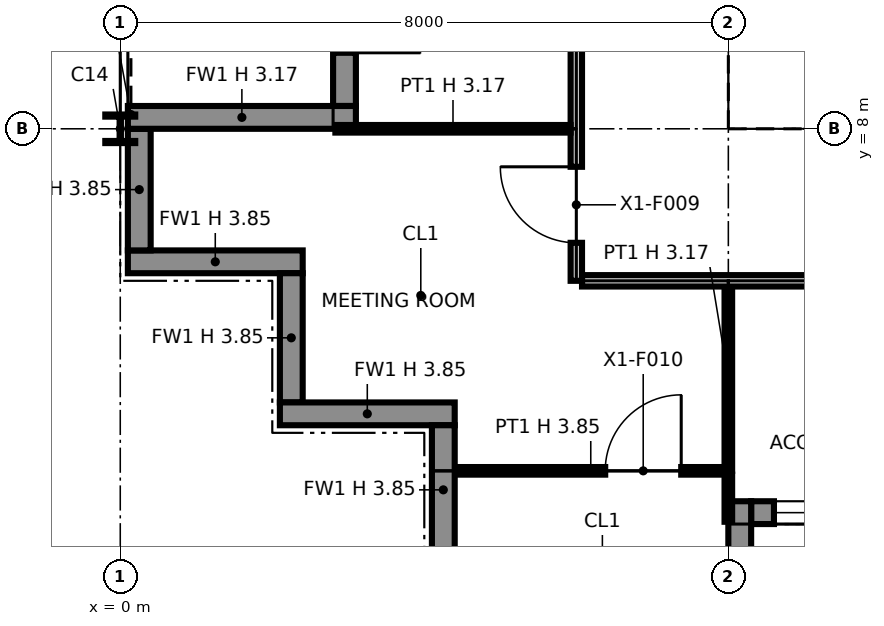
"""IFC4 building model, lengths in metres.
Left out: names, types, materials, properties, quantities, classifications, styles, units other than length and angle.
Written with IfcOpenShell. Run it as: python <this file> out.ifc"""

import sys

from ifc_helpers import new_model, si_unit, direction, frame, frame_2d, origin, origin_2d, place, context, subcontext, project, spatial, polyline, rectangle, i_section, outline, extrude, element, fill, save


model = new_model("IFC4")
c1 = context("Model", 3, precision=1e-05, world=origin(), true_north=direction((0.0, 1.0)))
c2 = subcontext(c1, "Body", "Model", "MODEL_VIEW")
j1 = project(units=[si_unit("LENGTHUNIT", "METRE"), si_unit("PLANEANGLEUNIT", "RADIAN")], contexts=[c1])
p1 = place(None, origin())
s1 = spatial("IfcSite", under=j1, at=p1, CompositionType="ELEMENT")
p2 = place(p1, origin())
s2 = spatial("IfcBuilding", under=s1, at=p2, CompositionType="ELEMENT")
p3 = place(p2, frame((0.0, 0.0, 255.0)))
s3 = spatial("IfcBuildingStorey", under=s2, at=p3, CompositionType="ELEMENT", Elevation=255.0)
p4 = place(p3, frame((0.0, 8.0, 0.0), z_axis=(0.0, 0.0, 1.0), x_axis=(1.0, 0.0, 0.0)))
e1 = element("IfcColumn", 1, at=p4, inside=s3, PredefinedType="COLUMN", context=c2, shape_type="SweptSolid", body=[
    extrude(i_section(OverallWidth=0.394, OverallDepth=0.376, WebThickness=0.017, FlangeThickness=0.028, at=origin_2d()), origin(), (0.0, 0.0, 1.0), 3.85),
])
p5 = place(p3, frame((8.0, 8.0, 0.0), z_axis=(0.0, 0.0, 1.0), x_axis=(1.0, 0.0, 0.0)))
e2 = element("IfcColumn", 2, at=p5, inside=s3, PredefinedType="COLUMN", context=c2, shape_type="SweptSolid", body=[
    extrude(i_section(OverallWidth=0.371, OverallDepth=0.361, WebThickness=0.012, FlangeThickness=0.02, at=origin_2d()), origin(), (0.0, 0.0, 1.0), 3.85),
])
p6 = place(p3, frame((0.1, 6.25, 0.0), z_axis=(0.0, 0.0, 1.0), x_axis=(1.0, 0.0, 0.0)))
e3 = element("IfcWall", 3, at=p6, inside=s3, PredefinedType="SOLIDWALL", context=c2, shape_type="SweptSolid", body=[
    extrude(rectangle(XDim=2.3, YDim=0.3, at=frame_2d((1.15, 0.0))), origin(), (0.0, 0.0, 1.0), 3.85),
])
p7 = place(p3, frame((2.25, 6.1, 0.0), z_axis=(0.0, 0.0, 1.0), x_axis=(0.0, -1.0, 0.0)))
e4 = element("IfcWall", 4, at=p7, inside=s3, PredefinedType="SOLIDWALL", context=c2, shape_type="SweptSolid", body=[
    extrude(rectangle(XDim=1.7, YDim=0.3, at=frame_2d((0.85, 0.0))), origin(), (0.0, 0.0, 1.0), 3.85),
])
p8 = place(p3, frame((2.1, 4.25, 0.0), z_axis=(0.0, 0.0, 1.0), x_axis=(1.0, 0.0, 0.0)))
e5 = element("IfcWall", 5, at=p8, inside=s3, PredefinedType="SOLIDWALL", context=c2, shape_type="SweptSolid", body=[
    extrude(rectangle(XDim=2.3, YDim=0.3, at=frame_2d((1.15, 0.0))), origin(), (0.0, 0.0, 1.0), 3.85),
])
p9 = place(p3, frame((4.25, 4.1, 0.0), z_axis=(0.0, 0.0, 1.0), x_axis=(0.0, -1.0, 0.0)))
e6 = element("IfcWall", 6, at=p9, inside=s3, PredefinedType="SOLIDWALL", context=c2, shape_type="SweptSolid", body=[
    extrude(rectangle(XDim=1.7, YDim=0.3, at=frame_2d((0.85, 0.0))), origin(), (0.0, 0.0, 1.0), 3.85),
])
p10 = place(p3, frame((8.3, 2.95, 0.0), z_axis=(0.0, 0.0, 1.0), x_axis=(1.0, 0.0, 0.0)))
e7 = element("IfcWall", 7, at=p10, inside=s3, PredefinedType="SOLIDWALL", context=c2, shape_type="SweptSolid", body=[
    extrude(rectangle(XDim=7.4, YDim=0.3, at=frame_2d((3.7, 0.0))), origin(), (0.0, 0.0, 1.0), 3.85),
])
p11 = place(p10, frame((0.3, 0.0, 0.9)))
e8 = element("IfcOpeningElement", 8, at=p11, cuts=e7, PredefinedType="OPENING", context=c2, shape_type="SweptSolid", body=[
    extrude(rectangle(XDim=2.8, YDim=2.2, at=frame_2d((1.4, 1.1))), frame((0.0, 0.16, 0.0), z_axis=(0.0, -1.0, 0.0), x_axis=(1.0, 0.0, 0.0)), (0.0, 0.0, 1.0), 0.32),
])
p12 = place(p10, frame((4.7, 0.0, 0.0)))
e9 = element("IfcOpeningElement", 9, at=p12, cuts=e7, PredefinedType="OPENING", context=c2, shape_type="SweptSolid", body=[
    extrude(rectangle(XDim=2.0, YDim=2.4, at=frame_2d((1.0, 1.2))), frame((0.0, 0.16, 0.0), z_axis=(0.0, -1.0, 0.0), x_axis=(1.0, 0.0, 0.0)), (0.0, 0.0, 1.0), 0.32),
])
p13 = place(p3, frame((8.15, 0.1, 0.0), z_axis=(0.0, 0.0, 1.0), x_axis=(0.0, 1.0, 0.0)))
e10 = element("IfcWall", 10, at=p13, inside=s3, PredefinedType="SOLIDWALL", context=c2, shape_type="SweptSolid", body=[
    extrude(rectangle(XDim=3.0, YDim=0.3, at=frame_2d((1.5, 0.0))), origin(), (0.0, 0.0, 1.0), 3.171),
])
p14 = place(p3, frame((2.95, 15.7, 0.0), z_axis=(0.0, 0.0, 1.0), x_axis=(0.0, -1.0, 0.0)))
e11 = element("IfcWall", 11, at=p14, inside=s3, PredefinedType="SOLIDWALL", context=c2, shape_type="SweptSolid", body=[
    extrude(rectangle(XDim=7.4, YDim=0.3, at=frame_2d((3.7, 0.0))), origin(), (0.0, 0.0, 1.0), 3.85),
])
p15 = place(p14, frame((0.3, 0.0, 0.9)))
e12 = element("IfcOpeningElement", 12, at=p15, cuts=e11, PredefinedType="OPENING", context=c2, shape_type="SweptSolid", body=[
    extrude(rectangle(XDim=2.8, YDim=2.2, at=frame_2d((1.4, 1.1))), frame((0.0, 0.16, 0.0), z_axis=(0.0, -1.0, 0.0), x_axis=(1.0, 0.0, 0.0)), (0.0, 0.0, 1.0), 0.32),
])
p16 = place(p14, frame((4.7, 0.0, 0.0)))
e13 = element("IfcOpeningElement", 13, at=p16, cuts=e11, PredefinedType="OPENING", context=c2, shape_type="SweptSolid", body=[
    extrude(rectangle(XDim=2.0, YDim=2.4, at=frame_2d((1.0, 1.2))), frame((0.0, 0.16, 0.0), z_axis=(0.0, -1.0, 0.0), x_axis=(1.0, 0.0, 0.0)), (0.0, 0.0, 1.0), 0.32),
])
p17 = place(p3, frame((0.1, 8.15, 0.0), z_axis=(0.0, 0.0, 1.0), x_axis=(1.0, 0.0, 0.0)))
e14 = element("IfcWall", 14, at=p17, inside=s3, PredefinedType="SOLIDWALL", context=c2, shape_type="SweptSolid", body=[
    extrude(rectangle(XDim=3.0, YDim=0.3, at=frame_2d((1.5, 0.0))), origin(), (0.0, 0.0, 1.0), 3.171),
])
p18 = place(p3, frame((0.25, 8.0, 0.0), z_axis=(0.0, 0.0, 1.0), x_axis=(0.0, -1.0, 0.0)))
e15 = element("IfcWall", 15, at=p18, inside=s3, PredefinedType="SOLIDWALL", context=c2, shape_type="SweptSolid", body=[
    extrude(rectangle(XDim=1.6, YDim=0.3, at=frame_2d((0.8, 0.0))), origin(), (0.0, 0.0, 1.0), 3.85),
])
p19 = place(p3, frame((8.65, 8.75, 0.0), z_axis=(0.0, 0.0, 1.0), x_axis=(1.0, 0.0, 0.0)))
e16 = element("IfcWall", 16, at=p19, inside=s3, PredefinedType="PARTITIONING", context=c2, shape_type="SweptSolid", body=[
    extrude(outline(polyline([(0.0, 0.0), (14.7, 0.0), (14.7, 3.85), (7.438, 3.85), (7.438, 3.308), (7.262, 3.308), (7.261, 3.85), (0.0, 3.85), (0.0, 0.0)])), frame((0.0, 0.1, 0.0), z_axis=(0.0, -1.0, 0.0), x_axis=(1.0, 0.0, 0.0)), (0.0, 0.0, 1.0), 0.2),
])
p20 = place(p19, frame((1.3, 0.0, 0.0)))
e17 = element("IfcOpeningElement", 17, at=p20, cuts=e16, PredefinedType="OPENING", context=c2, shape_type="SweptSolid", body=[
    extrude(rectangle(XDim=1.4, YDim=2.1, at=frame_2d((0.7, 1.05))), frame((0.0, 0.11, 0.0), z_axis=(0.0, -1.0, 0.0), x_axis=(1.0, 0.0, 0.0)), (0.0, 0.0, 1.0), 0.22),
])
p21 = place(p19, frame((4.6, 0.0, 0.0)))
e18 = element("IfcOpeningElement", 18, at=p21, cuts=e16, PredefinedType="OPENING", context=c2, shape_type="SweptSolid", body=[
    extrude(rectangle(XDim=1.4, YDim=2.1, at=frame_2d((0.7, 1.05))), frame((0.0, 0.11, 0.0), z_axis=(0.0, -1.0, 0.0), x_axis=(1.0, 0.0, 0.0)), (0.0, 0.0, 1.0), 0.22),
])
p22 = place(p19, frame((10.4, 0.0, 0.0)))
e19 = element("IfcOpeningElement", 19, at=p22, cuts=e16, PredefinedType="OPENING", context=c2, shape_type="SweptSolid", body=[
    extrude(rectangle(XDim=1.2, YDim=2.1, at=frame_2d((0.6, 1.05))), frame((0.0, 0.11, 0.0), z_axis=(0.0, -1.0, 0.0), x_axis=(1.0, 0.0, 0.0)), (0.0, 0.0, 1.0), 0.22),
])
p23 = place(p3, frame((8.75, 8.85, 0.0), z_axis=(0.0, 0.0, 1.0), x_axis=(0.0, 1.0, 0.0)))
e20 = element("IfcWall", 20, at=p23, inside=s3, PredefinedType="PARTITIONING", context=c2, shape_type="SweptSolid", body=[
    extrude(outline(polyline([(0.0, 0.0), (14.3, 0.0), (14.3, 3.85), (10.225, 3.85), (10.224, 3.44), (10.076, 3.44), (10.075, 3.85), (7.239, 3.85), (7.238, 3.308), (7.062, 3.308), (7.062, 3.85), (0.0, 3.85), (0.0, 0.0)])), frame((0.0, 0.1, 0.0), z_axis=(0.0, -1.0, 0.0), x_axis=(1.0, 0.0, 0.0)), (0.0, 0.0, 1.0), 0.2),
])
p24 = place(p23, frame((8.3, 0.0, 0.0)))
e21 = element("IfcOpeningElement", 21, at=p24, cuts=e20, PredefinedType="OPENING", context=c2, shape_type="SweptSolid", body=[
    extrude(rectangle(XDim=1.8, YDim=2.1, at=frame_2d((0.9, 1.05))), frame((0.0, 0.11, 0.0), z_axis=(0.0, -1.0, 0.0), x_axis=(1.0, 0.0, 0.0)), (0.0, 0.0, 1.0), 0.22),
])
p25 = place(p3, frame((8.0, 2.83, 0.0), z_axis=(0.0, 0.0, 1.0), x_axis=(0.0, 1.0, 0.0)))
e22 = element("IfcWall", 22, at=p25, inside=s3, PredefinedType="PARTITIONING", context=c2, shape_type="SweptSolid", body=[
    extrude(rectangle(XDim=0.62, YDim=0.1, at=frame_2d((0.31, 0.0))), origin(), (0.0, 0.0, 1.0), 3.172),
])
p26 = place(p3, frame((4.43, 3.5, 0.0), z_axis=(0.0, 0.0, 1.0), x_axis=(1.0, 0.0, 0.0)))
e23 = element("IfcWall", 23, at=p26, inside=s3, PredefinedType="PARTITIONING", context=c2, shape_type="SweptSolid", body=[
    extrude(rectangle(XDim=3.52, YDim=0.1, at=frame_2d((1.76, 0.0))), origin(), (0.0, 0.0, 1.0), 3.85),
])
p27 = place(p26, frame((1.95, 0.0, 0.0)))
e24 = element("IfcOpeningElement", 24, at=p27, cuts=e23, PredefinedType="OPENING", context=c2, shape_type="SweptSolid", body=[
    extrude(rectangle(XDim=1.0, YDim=2.1, at=frame_2d((0.5, 1.05))), frame((0.0, 0.06, 0.0), z_axis=(0.0, -1.0, 0.0), x_axis=(1.0, 0.0, 0.0)), (0.0, 0.0, 1.0), 0.12),
])
p28 = place(p3, frame((8.0, 3.5, 0.0), z_axis=(0.0, 0.0, 1.0), x_axis=(0.0, 1.0, 0.0)))
e25 = element("IfcWall", 25, at=p28, inside=s3, PredefinedType="PARTITIONING", context=c2, shape_type="SweptSolid", body=[
    extrude(rectangle(XDim=2.425, YDim=0.1, at=frame_2d((1.212, 0.0))), origin(), (0.0, 0.0, 1.0), 3.172),
])
p29 = place(p3, frame((6.075, 6.0, 0.0), z_axis=(0.0, 0.0, 1.0), x_axis=(1.0, 0.0, 0.0)))
e26 = element("IfcWall", 26, at=p29, inside=s3, PredefinedType="PARTITIONING", context=c2, shape_type="SweptSolid", body=[
    extrude(rectangle(XDim=35.85, YDim=0.15, at=frame_2d((17.925, 0.0))), origin(), (0.0, 0.0, 1.0), 3.85),
])
p30 = place(p29, frame((14.425, 0.0, 0.0), z_axis=(0.0, 0.0, 1.0), x_axis=(-1.0, 0.0, 0.0)))
e27 = element("IfcOpeningElement", 27, at=p30, cuts=e26, PredefinedType="OPENING", context=c2, shape_type="SweptSolid", body=[
    extrude(rectangle(XDim=1.0, YDim=2.1, at=frame_2d((0.5, 1.05))), frame((0.0, 0.085, 0.0), z_axis=(0.0, -1.0, 0.0), x_axis=(1.0, 0.0, 0.0)), (0.0, 0.0, 1.0), 0.17),
])
p31 = place(p29, frame((30.425, 0.0, 0.0), z_axis=(0.0, 0.0, 1.0), x_axis=(-1.0, 0.0, 0.0)))
e28 = element("IfcOpeningElement", 28, at=p31, cuts=e26, PredefinedType="OPENING", context=c2, shape_type="SweptSolid", body=[
    extrude(rectangle(XDim=1.0, YDim=2.1, at=frame_2d((0.5, 1.05))), frame((0.0, 0.085, 0.0), z_axis=(0.0, -1.0, 0.0), x_axis=(1.0, 0.0, 0.0)), (0.0, 0.0, 1.0), 0.17),
])
p32 = place(p29, frame((4.425, 0.0, 0.0), z_axis=(0.0, 0.0, 1.0), x_axis=(-1.0, 0.0, 0.0)))
e29 = element("IfcOpeningElement", 29, at=p32, cuts=e26, PredefinedType="OPENING", context=c2, shape_type="SweptSolid", body=[
    extrude(rectangle(XDim=1.0, YDim=2.1, at=frame_2d((0.5, 1.05))), frame((0.0, 0.085, 0.0), z_axis=(0.0, -1.0, 0.0), x_axis=(1.0, 0.0, 0.0)), (0.0, 0.0, 1.0), 0.17),
])
p33 = place(p29, frame((8.425, 0.0, 0.0), z_axis=(0.0, 0.0, 1.0), x_axis=(-1.0, 0.0, 0.0)))
e30 = element("IfcOpeningElement", 30, at=p33, cuts=e26, PredefinedType="OPENING", context=c2, shape_type="SweptSolid", body=[
    extrude(rectangle(XDim=1.0, YDim=2.1, at=frame_2d((0.5, 1.05))), frame((0.0, 0.085, 0.0), z_axis=(0.0, -1.0, 0.0), x_axis=(1.0, 0.0, 0.0)), (0.0, 0.0, 1.0), 0.17),
])
p34 = place(p29, frame((19.425, 0.0, 0.0), z_axis=(0.0, 0.0, 1.0), x_axis=(-1.0, 0.0, 0.0)))
e31 = element("IfcOpeningElement", 31, at=p34, cuts=e26, PredefinedType="OPENING", context=c2, shape_type="SweptSolid", body=[
    extrude(rectangle(XDim=1.0, YDim=2.1, at=frame_2d((0.5, 1.05))), frame((0.0, 0.085, 0.0), z_axis=(0.0, -1.0, 0.0), x_axis=(1.0, 0.0, 0.0)), (0.0, 0.0, 1.0), 0.17),
])
p35 = place(p29, frame((24.425, 0.0, 0.0), z_axis=(0.0, 0.0, 1.0), x_axis=(-1.0, 0.0, 0.0)))
e32 = element("IfcOpeningElement", 32, at=p35, cuts=e26, PredefinedType="OPENING", context=c2, shape_type="SweptSolid", body=[
    extrude(rectangle(XDim=1.0, YDim=2.1, at=frame_2d((0.5, 1.05))), frame((0.0, 0.085, 0.0), z_axis=(0.0, -1.0, 0.0), x_axis=(1.0, 0.0, 0.0)), (0.0, 0.0, 1.0), 0.17),
])
p36 = place(p29, frame((35.425, 0.0, 0.0), z_axis=(0.0, 0.0, 1.0), x_axis=(-1.0, 0.0, 0.0)))
e33 = element("IfcOpeningElement", 33, at=p36, cuts=e26, PredefinedType="OPENING", context=c2, shape_type="SweptSolid", body=[
    extrude(rectangle(XDim=1.0, YDim=2.1, at=frame_2d((0.5, 1.05))), frame((0.0, 0.085, 0.0), z_axis=(0.0, -1.0, 0.0), x_axis=(1.0, 0.0, 0.0)), (0.0, 0.0, 1.0), 0.17),
])
p37 = place(p3, frame((6.0, 6.0, 0.0), z_axis=(0.0, 0.0, 1.0), x_axis=(0.0, 1.0, 0.0)))
e34 = element("IfcWall", 34, at=p37, inside=s3, PredefinedType="PARTITIONING", context=c2, shape_type="SweptSolid", body=[
    extrude(outline(polyline([(0.0, 0.0), (13.375, 0.0), (13.375, 3.85), (10.3, 3.85), (10.298, 3.172), (9.702, 3.172), (9.7, 3.85), (6.3, 3.85), (6.298, 3.172), (5.702, 3.172), (5.7, 3.85), (2.3, 3.85), (2.298, 3.172), (1.702, 3.172), (1.7, 3.85), (0.0, 3.85), (0.0, 0.0)])), frame((0.0, 0.075, 0.0), z_axis=(0.0, -1.0, 0.0), x_axis=(1.0, 0.0, 0.0)), (0.0, 0.0, 1.0), 0.15),
])
p38 = place(p37, frame((0.5, 0.0, 0.0)))
e35 = element("IfcOpeningElement", 35, at=p38, cuts=e34, PredefinedType="OPENING", context=c2, shape_type="SweptSolid", body=[
    extrude(rectangle(XDim=1.0, YDim=2.1, at=frame_2d((0.5, 1.05))), frame((0.0, 0.085, 0.0), z_axis=(0.0, -1.0, 0.0), x_axis=(1.0, 0.0, 0.0)), (0.0, 0.0, 1.0), 0.17),
])
p39 = place(p37, frame((3.5, 0.0, 0.0)))
e36 = element("IfcOpeningElement", 36, at=p39, cuts=e34, PredefinedType="OPENING", context=c2, shape_type="SweptSolid", body=[
    extrude(rectangle(XDim=1.0, YDim=2.1, at=frame_2d((0.5, 1.05))), frame((0.0, 0.085, 0.0), z_axis=(0.0, -1.0, 0.0), x_axis=(1.0, 0.0, 0.0)), (0.0, 0.0, 1.0), 0.17),
])
p40 = place(p37, frame((7.5, 0.0, 0.0)))
e37 = element("IfcOpeningElement", 37, at=p40, cuts=e34, PredefinedType="OPENING", context=c2, shape_type="SweptSolid", body=[
    extrude(rectangle(XDim=1.0, YDim=2.1, at=frame_2d((0.5, 1.05))), frame((0.0, 0.085, 0.0), z_axis=(0.0, -1.0, 0.0), x_axis=(1.0, 0.0, 0.0)), (0.0, 0.0, 1.0), 0.17),
])
p41 = place(p37, frame((11.225, 0.0, 0.0)))
e38 = element("IfcOpeningElement", 38, at=p41, cuts=e34, PredefinedType="OPENING", context=c2, shape_type="SweptSolid", body=[
    extrude(rectangle(XDim=1.0, YDim=2.1, at=frame_2d((0.5, 1.05))), frame((0.0, 0.085, 0.0), z_axis=(0.0, -1.0, 0.0), x_axis=(1.0, 0.0, 0.0)), (0.0, 0.0, 1.0), 0.17),
])
p42 = place(p3, frame((2.83, 8.0, 0.0), z_axis=(0.0, 0.0, 1.0), x_axis=(1.0, 0.0, 0.0)))
e39 = element("IfcWall", 39, at=p42, inside=s3, PredefinedType="PARTITIONING", context=c2, shape_type="SweptSolid", body=[
    extrude(rectangle(XDim=3.095, YDim=0.1, at=frame_2d((1.547, 0.0))), origin(), (0.0, 0.0, 1.0), 3.172),
])
p43 = place(p11, origin())
e40 = element("IfcWindow", 40, at=p43, inside=s3, PartitioningType="SINGLE_PANEL", PredefinedType="WINDOW", context=c2, shape_type="SweptSolid", body=[
    extrude(rectangle(XDim=2.8, YDim=2.2, at=frame_2d((1.4, 1.1))), frame((0.0, 0.03, 0.0), z_axis=(0.0, -1.0, 0.0), x_axis=(1.0, 0.0, 0.0)), (0.0, 0.0, 1.0), 0.06),
])
fill(e8, e40)
p44 = place(p38, origin())
e41 = element("IfcDoor", 41, at=p44, inside=s3, OperationType="SINGLE_SWING_RIGHT", PredefinedType="DOOR", context=c2, shape_type="SweptSolid", body=[
    extrude(rectangle(XDim=1.0, YDim=2.1, at=frame_2d((0.5, 1.05))), frame((0.0, 0.025, 0.0), z_axis=(0.0, -1.0, 0.0), x_axis=(1.0, 0.0, 0.0)), (0.0, 0.0, 1.0), 0.05),
])
fill(e35, e41)
p45 = place(p27, origin())
e42 = element("IfcDoor", 42, at=p45, inside=s3, OperationType="SINGLE_SWING_RIGHT", PredefinedType="DOOR", context=c2, shape_type="SweptSolid", body=[
    extrude(rectangle(XDim=1.0, YDim=2.1, at=frame_2d((0.5, 1.05))), frame((0.0, 0.025, 0.0), z_axis=(0.0, -1.0, 0.0), x_axis=(1.0, 0.0, 0.0)), (0.0, 0.0, 1.0), 0.05),
])
fill(e24, e42)
save(model, sys.argv[1])
